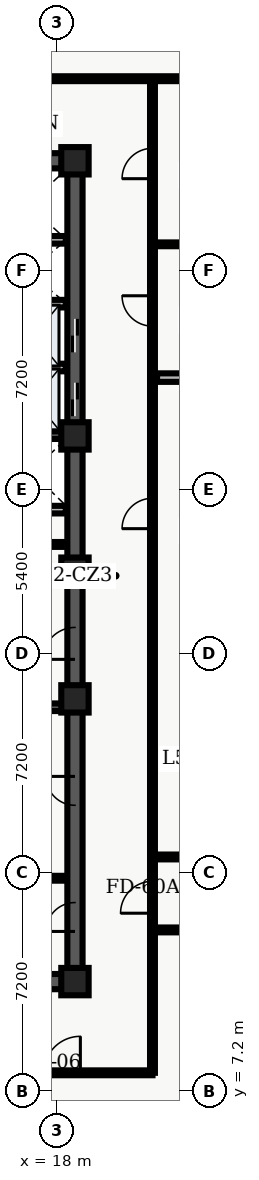
"""IFC4 building model, lengths in metres.
Left out: names, types, materials, properties, quantities, classifications, styles, units other than length and angle.
Written with IfcOpenShell. Run it as: python <this file> out.ifc"""

import sys

from ifc_helpers import new_model, entity, si_unit, converted_unit, direction, frame, origin_with_axes, origin_2d_with_axis, place, context, subcontext, project, spatial, polyline, rectangle, outline, extrude, element, fill, save


model = new_model("IFC4")
c1 = context("Model", 3, precision=1e-05, world=origin_with_axes(), true_north=direction((0.0, 1.0)))
c2 = subcontext(c1, "Body", "Model", "MODEL_VIEW")
j1 = project(units=[si_unit("LENGTHUNIT", "METRE"), converted_unit("PLANEANGLEUNIT", "DEGREE", entity("IfcPlaneAngleMeasure", 0.017), si_unit("PLANEANGLEUNIT", "RADIAN"), dimensions=[0, 0, 0, 0, 0, 0, 0])], contexts=[c1])
p1 = place(None, origin_with_axes())
s1 = spatial("IfcSite", under=j1, at=p1, CompositionType="ELEMENT")
p2 = place(p1, origin_with_axes())
s2 = spatial("IfcBuilding", under=s1, at=p2, CompositionType="ELEMENT")
p3 = place(p2, frame((0.0, 0.0, 212.1), z_axis=(0.0, 0.0, 1.0), x_axis=(1.0, 0.0, 0.0)))
s3 = spatial("IfcBuildingStorey", under=s2, at=p3, CompositionType="ELEMENT", Elevation=212.1)
p4 = place(p3, frame((11.4, 10.8, 0.0), z_axis=(0.0, 0.0, 1.0), x_axis=(1.0, 0.0, 0.0)))
e1 = element("IfcWall", 1, at=p4, inside=s3, PredefinedType="SHEAR", context=c2, shape_type="SweptSolid", body=[
    extrude(outline(polyline([(0.0, -0.25), (7.2, -0.25), (7.2, 0.25), (0.0, 0.25), (0.0, -0.25)])), origin_with_axes(), (0.0, 0.0, 1.0), 3.66),
])
p5 = place(p4, frame((2.625, 0.0, 0.0), z_axis=(0.0, 0.0, 1.0), x_axis=(1.0, 0.0, 0.0)))
e2 = element("IfcOpeningElement", 2, at=p5, cuts=e1, PredefinedType="OPENING", context=c2, shape_type="SweptSolid", body=[
    extrude(rectangle(XDim=1.05, YDim=0.52, at=origin_2d_with_axis()), origin_with_axes(), (0.0, 0.0, 1.0), 2.15),
])
p6 = place(p3, frame((11.4, 37.8, 0.0), z_axis=(0.0, 0.0, 1.0), x_axis=(1.0, 0.0, 0.0)))
e3 = element("IfcWall", 3, at=p6, inside=s3, PredefinedType="SHEAR", context=c2, shape_type="SweptSolid", body=[
    extrude(outline(polyline([(0.0, -0.25), (7.2, -0.25), (7.2, 0.25), (0.0, 0.25), (0.0, -0.25)])), origin_with_axes(), (0.0, 0.0, 1.0), 3.66),
])
p7 = place(p6, frame((2.625, 0.0, 0.0), z_axis=(0.0, 0.0, 1.0), x_axis=(1.0, 0.0, 0.0)))
e4 = element("IfcOpeningElement", 4, at=p7, cuts=e3, PredefinedType="OPENING", context=c2, shape_type="SweptSolid", body=[
    extrude(rectangle(XDim=1.05, YDim=0.52, at=origin_2d_with_axis()), origin_with_axes(), (0.0, 0.0, 1.0), 2.15),
])
p8 = place(p3, frame((18.6, 10.8, 0.0), z_axis=(0.0, 0.0, 1.0), x_axis=(0.0, 1.0, 0.0)))
e5 = element("IfcWall", 5, at=p8, inside=s3, PredefinedType="SHEAR", context=c2, shape_type="SweptSolid", body=[
    extrude(outline(polyline([(0.0, -0.25), (13.5, -0.25), (13.5, 0.25), (0.0, 0.25), (0.0, -0.25)])), origin_with_axes(), (0.0, 0.0, 1.0), 3.66),
])
p9 = place(p8, frame((11.125, 0.0, 0.0), z_axis=(0.0, 0.0, 1.0), x_axis=(1.0, 0.0, 0.0)))
e6 = element("IfcOpeningElement", 6, at=p9, cuts=e5, PredefinedType="OPENING", context=c2, shape_type="SweptSolid", body=[
    extrude(rectangle(XDim=1.05, YDim=0.52, at=origin_2d_with_axis()), origin_with_axes(), (0.0, 0.0, 1.0), 2.15),
])
p10 = place(p8, frame((2.125, 0.0, 0.0), z_axis=(0.0, 0.0, 1.0), x_axis=(1.0, 0.0, 0.0)))
e7 = element("IfcOpeningElement", 7, at=p10, cuts=e5, PredefinedType="OPENING", context=c2, shape_type="SweptSolid", body=[
    extrude(rectangle(XDim=0.95, YDim=0.52, at=origin_2d_with_axis()), origin_with_axes(), (0.0, 0.0, 1.0), 2.15),
])
p11 = place(p8, frame((6.275, 0.0, 0.0), z_axis=(0.0, 0.0, 1.0), x_axis=(1.0, 0.0, 0.0)))
e8 = element("IfcOpeningElement", 8, at=p11, cuts=e5, PredefinedType="OPENING", context=c2, shape_type="SweptSolid", body=[
    extrude(rectangle(XDim=0.95, YDim=0.52, at=origin_2d_with_axis()), origin_with_axes(), (0.0, 0.0, 1.0), 2.15),
])
p12 = place(p3, frame((18.6, 24.3, 0.0), z_axis=(0.0, 0.0, 1.0), x_axis=(0.0, 1.0, 0.0)))
e9 = element("IfcWall", 9, at=p12, inside=s3, PredefinedType="SHEAR", context=c2, shape_type="SweptSolid", body=[
    extrude(outline(polyline([(0.0, -0.25), (13.5, -0.25), (13.5, 0.25), (0.0, 0.25), (0.0, -0.25)])), origin_with_axes(), (0.0, 0.0, 1.0), 3.66),
])
p13 = place(p12, frame((5.65, 0.0, 0.0), z_axis=(0.0, 0.0, 1.0), x_axis=(1.0, 0.0, 0.0)))
e10 = element("IfcOpeningElement", 10, at=p13, cuts=e9, PredefinedType="OPENING", context=c2, shape_type="SweptSolid", body=[
    extrude(rectangle(XDim=1.1, YDim=0.52, at=origin_2d_with_axis()), origin_with_axes(), (0.0, 0.0, 1.0), 2.15),
])
p14 = place(p12, frame((7.75, 0.0, 0.0), z_axis=(0.0, 0.0, 1.0), x_axis=(1.0, 0.0, 0.0)))
e11 = element("IfcOpeningElement", 11, at=p14, cuts=e9, PredefinedType="OPENING", context=c2, shape_type="SweptSolid", body=[
    extrude(rectangle(XDim=1.1, YDim=0.52, at=origin_2d_with_axis()), origin_with_axes(), (0.0, 0.0, 1.0), 2.15),
])
for number, where, z_axis, x_axis in (
    (12, (11.65, 19.825, 0.0), (0.0, 0.0, 1.0), (1.0, 0.0, 0.0)),
    (13, (11.65, 28.775, 0.0), (0.0, 0.0, 1.0), (1.0, 0.0, 0.0)),
):
    element("IfcWall", number, at=place(p3, frame(where, z_axis=z_axis, x_axis=x_axis)), inside=s3, PredefinedType="SHEAR", context=c2, shape_type="SweptSolid", body=[
        extrude(outline(polyline([(0.0, -0.125), (6.7, -0.125), (6.7, 0.125), (0.0, 0.125), (0.0, -0.125)])), origin_with_axes(), (0.0, 0.0, 1.0), 3.66),
    ])
p15 = place(p3, frame((11.7, 24.1, 0.0), z_axis=(0.0, 0.0, 1.0), x_axis=(1.0, 0.0, 0.0)))
e14 = element("IfcWall", 14, at=p15, inside=s3, PredefinedType="SOLIDWALL", context=c2, shape_type="SweptSolid", body=[
    extrude(outline(polyline([(0.0, -0.125), (6.6, -0.125), (6.6, 0.125), (0.0, 0.125), (0.0, -0.125)])), origin_with_axes(), (0.0, 0.0, 1.0), 2.7),
])
p16 = place(p15, frame((3.75, 0.0, 0.0), z_axis=(0.0, 0.0, 1.0), x_axis=(1.0, 0.0, 0.0)))
e15 = element("IfcOpeningElement", 15, at=p16, cuts=e14, PredefinedType="OPENING", context=c2, shape_type="SweptSolid", body=[
    extrude(rectangle(XDim=0.9, YDim=0.27, at=origin_2d_with_axis()), origin_with_axes(), (0.0, 0.0, 1.0), 2.15),
])
p17 = place(p3, frame((11.7, 26.325, 0.0), z_axis=(0.0, 0.0, 1.0), x_axis=(1.0, 0.0, 0.0)))
e16 = element("IfcWall", 16, at=p17, inside=s3, PredefinedType="SOLIDWALL", context=c2, shape_type="SweptSolid", body=[
    extrude(outline(polyline([(0.0, -0.125), (6.6, -0.125), (6.6, 0.125), (0.0, 0.125), (0.0, -0.125)])), origin_with_axes(), (0.0, 0.0, 1.0), 2.7),
])
p18 = place(p17, frame((3.5, 0.0, 0.0), z_axis=(0.0, 0.0, 1.0), x_axis=(1.0, 0.0, 0.0)))
e17 = element("IfcOpeningElement", 17, at=p18, cuts=e16, PredefinedType="OPENING", context=c2, shape_type="SweptSolid", body=[
    extrude(rectangle(XDim=0.9, YDim=0.27, at=origin_2d_with_axis()), origin_with_axes(), (0.0, 0.0, 1.0), 2.15),
])
for number, where, z_axis, x_axis in (
    (18, (18.6, 10.8, 0.0), (0.0, 0.0, 1.0), (1.0, 0.0, 0.0)),
    (19, (18.6, 20.1, 0.0), (0.0, 0.0, 1.0), (1.0, 0.0, 0.0)),
    (20, (18.6, 24.3, 0.0), (0.0, 0.0, 1.0), (1.0, 0.0, 0.0)),
    (21, (18.6, 28.75, 0.0), (0.0, 0.0, 1.0), (1.0, 0.0, 0.0)),
    (22, (18.6, 37.8, 0.0), (0.0, 0.0, 1.0), (1.0, 0.0, 0.0)),
):
    element("IfcColumn", number, at=place(p3, frame(where, z_axis=z_axis, x_axis=x_axis)), inside=s3, PredefinedType="COLUMN", context=c2, shape_type="SweptSolid", body=[
        extrude(rectangle(XDim=0.9, YDim=0.9, at=origin_2d_with_axis()), origin_with_axes(), (0.0, 0.0, 1.0), 3.9),
    ])
p19 = place(p3, frame((14.62, 25.18, 0.0), z_axis=(0.0, 0.0, 1.0), x_axis=(1.0, 0.0, 0.0)))
e23 = element("IfcWall", 23, at=p19, inside=s3, PredefinedType="PARTITIONING", context=c2, shape_type="SweptSolid", body=[
    extrude(outline(polyline([(0.0, -0.08), (3.68, -0.08), (3.68, 0.08), (0.0, 0.08), (0.0, -0.08)])), origin_with_axes(), (0.0, 0.0, 1.0), 2.7),
])
p20 = place(p19, frame((1.95, 0.0, 0.0), z_axis=(0.0, 0.0, 1.0), x_axis=(1.0, 0.0, 0.0)))
e24 = element("IfcOpeningElement", 24, at=p20, cuts=e23, PredefinedType="OPENING", context=c2, shape_type="SweptSolid", body=[
    extrude(rectangle(XDim=0.9, YDim=0.18, at=origin_2d_with_axis()), origin_with_axes(), (0.0, 0.0, 1.0), 2.15),
])
p21 = place(p3, frame((15.84, 14.2, 0.0), z_axis=(0.0, 0.0, 1.0), x_axis=(1.0, 0.0, 0.0)))
e25 = element("IfcWall", 25, at=p21, inside=s3, PredefinedType="PARTITIONING", context=c2, shape_type="SweptSolid", body=[
    extrude(outline(polyline([(0.0, -0.08), (2.46, -0.08), (2.46, 0.08), (0.0, 0.08), (0.0, -0.08)])), origin_with_axes(), (0.0, 0.0, 1.0), 2.7),
])
for number, where, z_axis, x_axis in (
    (26, (15.84, 31.0, 0.0), (0.0, 0.0, 1.0), (1.0, 0.0, 0.0)),
    (27, (15.84, 33.1, 0.0), (0.0, 0.0, 1.0), (1.0, 0.0, 0.0)),
    (28, (15.84, 35.2, 0.0), (0.0, 0.0, 1.0), (1.0, 0.0, 0.0)),
):
    element("IfcWall", number, at=place(p3, frame(where, z_axis=z_axis, x_axis=x_axis)), inside=s3, PredefinedType="SOLIDWALL", context=c2, shape_type="SweptSolid", body=[
        extrude(outline(polyline([(0.0, -0.125), (2.46, -0.125), (2.46, 0.125), (0.0, 0.125), (0.0, -0.125)])), origin_with_axes(), (0.0, 0.0, 1.0), 2.7),
    ])
p22 = place(p3, frame((2.6, 7.8, 0.0), z_axis=(0.0, 0.0, 1.0), x_axis=(1.0, 0.0, 0.0)))
e29 = element("IfcWall", 29, at=p22, inside=s3, PredefinedType="PARTITIONING", context=c2, shape_type="SweptSolid", body=[
    extrude(outline(polyline([(0.0, -0.08), (18.55, -0.08), (18.55, 0.08), (0.0, 0.08), (0.0, -0.08)])), origin_with_axes(), (0.0, 0.0, 1.0), 2.7),
])
p23 = place(p22, frame((1.817, 0.0, 0.0), z_axis=(0.0, 0.0, 1.0), x_axis=(1.0, 0.0, 0.0)))
e30 = element("IfcOpeningElement", 30, at=p23, cuts=e29, PredefinedType="OPENING", context=c2, shape_type="SweptSolid", body=[
    extrude(rectangle(XDim=1.0, YDim=0.18, at=origin_2d_with_axis()), origin_with_axes(), (0.0, 0.0, 1.0), 2.15),
])
p24 = place(p22, frame((6.503, 0.0, 0.0), z_axis=(0.0, 0.0, 1.0), x_axis=(1.0, 0.0, 0.0)))
e31 = element("IfcOpeningElement", 31, at=p24, cuts=e29, PredefinedType="OPENING", context=c2, shape_type="SweptSolid", body=[
    extrude(rectangle(XDim=1.0, YDim=0.18, at=origin_2d_with_axis()), origin_with_axes(), (0.0, 0.0, 1.0), 2.15),
])
p25 = place(p22, frame((10.728, 0.0, 0.0), z_axis=(0.0, 0.0, 1.0), x_axis=(1.0, 0.0, 0.0)))
e32 = element("IfcOpeningElement", 32, at=p25, cuts=e29, PredefinedType="OPENING", context=c2, shape_type="SweptSolid", body=[
    extrude(rectangle(XDim=1.0, YDim=0.18, at=origin_2d_with_axis()), origin_with_axes(), (0.0, 0.0, 1.0), 2.15),
])
p26 = place(p22, frame((15.578, 0.0, 0.0), z_axis=(0.0, 0.0, 1.0), x_axis=(1.0, 0.0, 0.0)))
e33 = element("IfcOpeningElement", 33, at=p26, cuts=e29, PredefinedType="OPENING", context=c2, shape_type="SweptSolid", body=[
    extrude(rectangle(XDim=1.2, YDim=0.18, at=origin_2d_with_axis()), origin_with_axes(), (0.0, 0.0, 1.0), 2.2),
])
p27 = place(p3, frame((2.6, 40.5, 0.0), z_axis=(0.0, 0.0, 1.0), x_axis=(1.0, 0.0, 0.0)))
e34 = element("IfcWall", 34, at=p27, inside=s3, PredefinedType="PARTITIONING", context=c2, shape_type="SweptSolid", body=[
    extrude(outline(polyline([(0.0, -0.08), (28.59, -0.08), (28.59, 0.08), (0.0, 0.08), (0.0, -0.08)])), origin_with_axes(), (0.0, 0.0, 1.0), 2.7),
])
p28 = place(p27, frame((8.755, 0.0, 0.0), z_axis=(0.0, 0.0, 1.0), x_axis=(1.0, 0.0, 0.0)))
e35 = element("IfcOpeningElement", 35, at=p28, cuts=e34, PredefinedType="OPENING", context=c2, shape_type="SweptSolid", body=[
    extrude(rectangle(XDim=1.0, YDim=0.18, at=origin_2d_with_axis()), origin_with_axes(), (0.0, 0.0, 1.0), 2.15),
])
p29 = place(p3, frame((21.15, 7.8, 0.0), z_axis=(0.0, 0.0, 1.0), x_axis=(0.0, 1.0, 0.0)))
e36 = element("IfcWall", 36, at=p29, inside=s3, PredefinedType="PARTITIONING", context=c2, shape_type="SweptSolid", body=[
    extrude(outline(polyline([(0.0, -0.08), (32.7, -0.08), (32.7, 0.08), (0.0, 0.08), (0.0, -0.08)])), origin_with_axes(), (0.0, 0.0, 1.0), 2.7),
])
p30 = place(p29, frame((18.399, 0.0, 0.0), z_axis=(0.0, 0.0, 1.0), x_axis=(1.0, 0.0, 0.0)))
e37 = element("IfcOpeningElement", 37, at=p30, cuts=e36, PredefinedType="OPENING", context=c2, shape_type="SweptSolid", body=[
    extrude(rectangle(XDim=1.0, YDim=0.18, at=origin_2d_with_axis()), origin_with_axes(), (0.0, 0.0, 1.0), 2.15),
])
p31 = place(p29, frame((25.06, 0.0, 0.0), z_axis=(0.0, 0.0, 1.0), x_axis=(1.0, 0.0, 0.0)))
e38 = element("IfcOpeningElement", 38, at=p31, cuts=e36, PredefinedType="OPENING", context=c2, shape_type="SweptSolid", body=[
    extrude(rectangle(XDim=1.0, YDim=0.18, at=origin_2d_with_axis()), origin_with_axes(), (0.0, 0.0, 1.0), 2.15),
])
p32 = place(p29, frame((29.911, 0.0, 0.0), z_axis=(0.0, 0.0, 1.0), x_axis=(1.0, 0.0, 0.0)))
e39 = element("IfcOpeningElement", 39, at=p32, cuts=e36, PredefinedType="OPENING", context=c2, shape_type="SweptSolid", body=[
    extrude(rectangle(XDim=1.0, YDim=0.18, at=origin_2d_with_axis()), origin_with_axes(), (0.0, 0.0, 1.0), 2.15),
])
p33 = place(p29, frame((5.775, 0.0, 0.0), z_axis=(0.0, 0.0, 1.0), x_axis=(1.0, 0.0, 0.0)))
e40 = element("IfcOpeningElement", 40, at=p33, cuts=e36, PredefinedType="OPENING", context=c2, shape_type="SweptSolid", body=[
    extrude(rectangle(XDim=1.05, YDim=0.18, at=origin_2d_with_axis()), origin_with_axes(), (0.0, 0.0, 1.0), 2.15),
])
p34 = place(p3, frame((21.3, 30.668, 0.0), z_axis=(0.0, 0.0, 1.0), x_axis=(1.0, 0.0, 0.0)))
e41 = element("IfcWall", 41, at=p34, inside=s3, PredefinedType="PARTITIONING", context=c2, shape_type="SweptSolid", body=[
    extrude(outline(polyline([(0.0, -0.14), (9.89, -0.14), (9.89, 0.14), (0.0, 0.14), (0.0, -0.14)])), origin_with_axes(), (0.0, 0.0, 1.0), 2.7),
])
p35 = place(p3, frame((21.3, 35.052, 0.0), z_axis=(0.0, 0.0, 1.0), x_axis=(1.0, 0.0, 0.0)))
e42 = element("IfcWall", 42, at=p35, inside=s3, PredefinedType="PARTITIONING", context=c2, shape_type="SweptSolid", body=[
    extrude(outline(polyline([(0.0, -0.062), (9.89, -0.062), (9.89, 0.062), (0.0, 0.062), (0.0, -0.062)])), origin_with_axes(), (0.0, 0.0, 1.0), 2.7),
])
p36 = place(p3, frame((21.15, 12.5, 0.0), z_axis=(0.0, 0.0, 1.0), x_axis=(1.0, 0.0, 0.0)))
e43 = element("IfcWall", 43, at=p36, inside=s3, PredefinedType="PARTITIONING", context=c2, shape_type="SweptSolid", body=[
    extrude(outline(polyline([(0.0, -0.08), (15.2, -0.08), (15.2, 0.08), (0.0, 0.08), (0.0, -0.08)])), origin_with_axes(), (0.0, 0.0, 1.0), 2.7),
])
p37 = place(p36, frame((7.65, 0.0, 0.0), z_axis=(0.0, 0.0, 1.0), x_axis=(1.0, 0.0, 0.0)))
e44 = element("IfcOpeningElement", 44, at=p37, cuts=e43, PredefinedType="OPENING", context=c2, shape_type="SweptSolid", body=[
    extrude(rectangle(XDim=1.2, YDim=0.18, at=origin_2d_with_axis()), origin_with_axes(), (0.0, 0.0, 1.0), 2.2),
])
p38 = place(p3, frame((21.15, 14.9, 0.0), z_axis=(0.0, 0.0, 1.0), x_axis=(1.0, 0.0, 0.0)))
e45 = element("IfcWall", 45, at=p38, inside=s3, PredefinedType="PARTITIONING", context=c2, shape_type="SweptSolid", body=[
    extrude(outline(polyline([(0.0, -0.08), (15.2, -0.08), (15.2, 0.08), (0.0, 0.08), (0.0, -0.08)])), origin_with_axes(), (0.0, 0.0, 1.0), 2.7),
])
p39 = place(p38, frame((1.753, 0.0, 0.0), z_axis=(0.0, 0.0, 1.0), x_axis=(1.0, 0.0, 0.0)))
e46 = element("IfcOpeningElement", 46, at=p39, cuts=e45, PredefinedType="OPENING", context=c2, shape_type="SweptSolid", body=[
    extrude(rectangle(XDim=1.0, YDim=0.18, at=origin_2d_with_axis()), origin_with_axes(), (0.0, 0.0, 1.0), 2.15),
])
p40 = place(p38, frame((4.888, 0.0, 0.0), z_axis=(0.0, 0.0, 1.0), x_axis=(1.0, 0.0, 0.0)))
e47 = element("IfcOpeningElement", 47, at=p40, cuts=e45, PredefinedType="OPENING", context=c2, shape_type="SweptSolid", body=[
    extrude(rectangle(XDim=1.0, YDim=0.18, at=origin_2d_with_axis()), origin_with_axes(), (0.0, 0.0, 1.0), 2.15),
])
p41 = place(p38, frame((8.534, 0.0, 0.0), z_axis=(0.0, 0.0, 1.0), x_axis=(1.0, 0.0, 0.0)))
e48 = element("IfcOpeningElement", 48, at=p41, cuts=e45, PredefinedType="OPENING", context=c2, shape_type="SweptSolid", body=[
    extrude(rectangle(XDim=1.0, YDim=0.18, at=origin_2d_with_axis()), origin_with_axes(), (0.0, 0.0, 1.0), 2.15),
])
p42 = place(p38, frame((12.869, 0.0, 0.0), z_axis=(0.0, 0.0, 1.0), x_axis=(1.0, 0.0, 0.0)))
e49 = element("IfcOpeningElement", 49, at=p42, cuts=e45, PredefinedType="OPENING", context=c2, shape_type="SweptSolid", body=[
    extrude(rectangle(XDim=1.2, YDim=0.18, at=origin_2d_with_axis()), origin_with_axes(), (0.0, 0.0, 1.0), 2.2),
])
p43 = place(p12, frame((5.65, 0.0, 0.0), z_axis=(0.0, 0.0, 1.0), x_axis=(1.0, 0.0, 0.0)))
e50 = element("IfcDoor", 50, at=p43, inside=s3, OperationType="SLIDING_TO_LEFT", PredefinedType="DOOR", context=c2, shape_type="SweptSolid", body=[
    extrude(rectangle(XDim=1.1, YDim=0.09, at=origin_2d_with_axis()), origin_with_axes(), (0.0, 0.0, 1.0), 2.15),
])
fill(e10, e50)
p44 = place(p12, frame((7.75, 0.0, 0.0), z_axis=(0.0, 0.0, 1.0), x_axis=(1.0, 0.0, 0.0)))
e51 = element("IfcDoor", 51, at=p44, inside=s3, OperationType="SLIDING_TO_RIGHT", PredefinedType="DOOR", context=c2, shape_type="SweptSolid", body=[
    extrude(rectangle(XDim=1.1, YDim=0.09, at=origin_2d_with_axis()), origin_with_axes(), (0.0, 0.0, 1.0), 2.15),
])
fill(e11, e51)
p45 = place(p8, frame((11.125, 0.0, 0.0), z_axis=(0.0, 0.0, 1.0), x_axis=(1.0, 0.0, 0.0)))
e52 = element("IfcDoor", 52, at=p45, inside=s3, OperationType="SINGLE_SWING_LEFT", PredefinedType="DOOR", context=c2, shape_type="SweptSolid", body=[
    extrude(rectangle(XDim=1.05, YDim=0.09, at=origin_2d_with_axis()), origin_with_axes(), (0.0, 0.0, 1.0), 2.15),
])
fill(e6, e52)
p46 = place(p8, frame((2.125, 0.0, 0.0), z_axis=(0.0, 0.0, 1.0), x_axis=(1.0, 0.0, 0.0)))
e53 = element("IfcDoor", 53, at=p46, inside=s3, OperationType="SINGLE_SWING_LEFT", PredefinedType="DOOR", context=c2, shape_type="SweptSolid", body=[
    extrude(rectangle(XDim=0.95, YDim=0.09, at=origin_2d_with_axis()), origin_with_axes(), (0.0, 0.0, 1.0), 2.15),
])
fill(e7, e53)
p47 = place(p8, frame((6.275, 0.0, 0.0), z_axis=(0.0, 0.0, 1.0), x_axis=(1.0, 0.0, 0.0)))
e54 = element("IfcDoor", 54, at=p47, inside=s3, OperationType="SINGLE_SWING_RIGHT", PredefinedType="DOOR", context=c2, shape_type="SweptSolid", body=[
    extrude(rectangle(XDim=0.95, YDim=0.09, at=origin_2d_with_axis()), origin_with_axes(), (0.0, 0.0, 1.0), 2.15),
])
fill(e8, e54)
p48 = place(p22, frame((15.578, 0.0, 0.0), z_axis=(0.0, 0.0, 1.0), x_axis=(1.0, 0.0, 0.0)))
e55 = element("IfcDoor", 55, at=p48, inside=s3, OperationType="SINGLE_SWING_RIGHT", PredefinedType="DOOR", context=c2, shape_type="SweptSolid", body=[
    extrude(rectangle(XDim=1.2, YDim=0.09, at=origin_2d_with_axis()), origin_with_axes(), (0.0, 0.0, 1.0), 2.2),
])
fill(e33, e55)
p49 = place(p29, frame((18.399, 0.0, 0.0), z_axis=(0.0, 0.0, 1.0), x_axis=(1.0, 0.0, 0.0)))
e56 = element("IfcDoor", 56, at=p49, inside=s3, OperationType="SINGLE_SWING_LEFT", PredefinedType="DOOR", context=c2, shape_type="SweptSolid", body=[
    extrude(rectangle(XDim=1.0, YDim=0.09, at=origin_2d_with_axis()), origin_with_axes(), (0.0, 0.0, 1.0), 2.15),
])
fill(e37, e56)
p50 = place(p29, frame((25.06, 0.0, 0.0), z_axis=(0.0, 0.0, 1.0), x_axis=(1.0, 0.0, 0.0)))
e57 = element("IfcDoor", 57, at=p50, inside=s3, OperationType="SINGLE_SWING_RIGHT", PredefinedType="DOOR", context=c2, shape_type="SweptSolid", body=[
    extrude(rectangle(XDim=1.0, YDim=0.09, at=origin_2d_with_axis()), origin_with_axes(), (0.0, 0.0, 1.0), 2.15),
])
fill(e38, e57)
p51 = place(p29, frame((29.911, 0.0, 0.0), z_axis=(0.0, 0.0, 1.0), x_axis=(1.0, 0.0, 0.0)))
e58 = element("IfcDoor", 58, at=p51, inside=s3, OperationType="SINGLE_SWING_LEFT", PredefinedType="DOOR", context=c2, shape_type="SweptSolid", body=[
    extrude(rectangle(XDim=1.0, YDim=0.09, at=origin_2d_with_axis()), origin_with_axes(), (0.0, 0.0, 1.0), 2.15),
])
fill(e39, e58)
p52 = place(p29, frame((5.775, 0.0, 0.0), z_axis=(0.0, 0.0, 1.0), x_axis=(1.0, 0.0, 0.0)))
e59 = element("IfcDoor", 59, at=p52, inside=s3, OperationType="SINGLE_SWING_LEFT", PredefinedType="DOOR", context=c2, shape_type="SweptSolid", body=[
    extrude(rectangle(XDim=1.05, YDim=0.09, at=origin_2d_with_axis()), origin_with_axes(), (0.0, 0.0, 1.0), 2.15),
])
fill(e40, e59)
save(model, sys.argv[1])
